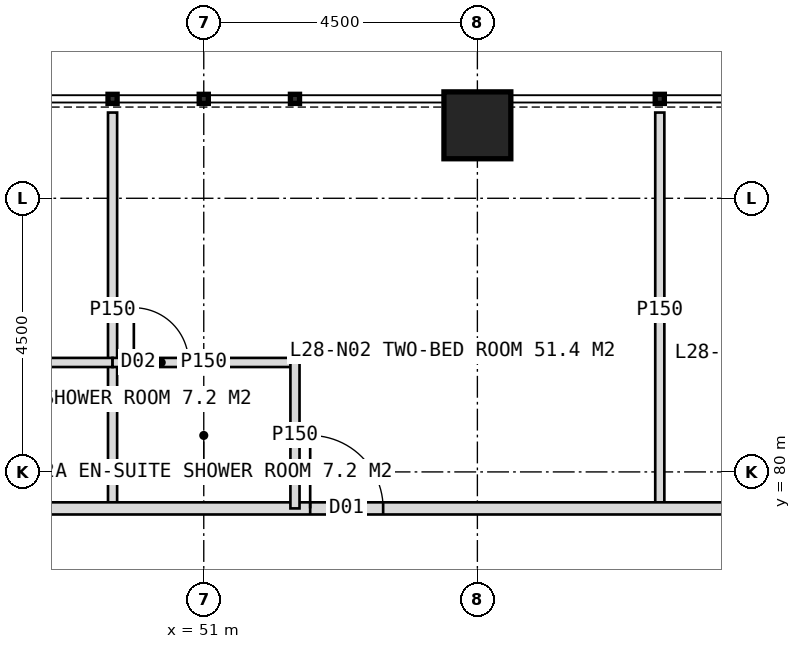
"""IFC4 building model, lengths in metres.
Left out: names, types, materials, properties, quantities, classifications, styles, units other than length and angle.
Written with IfcOpenShell. Run it as: python <this file> out.ifc"""

import sys

from ifc_helpers import new_model, si_unit, direction, frame, frame_2d, origin, origin_2d, place, context, subcontext, project, spatial, rectangle, hollow_rectangle, extrude, element, fill, save


model = new_model("IFC4")
c1 = context("Model", 3, precision=1e-05, world=origin(), true_north=direction((0.0, 1.0)))
c2 = subcontext(c1, "Body", "Model", "MODEL_VIEW")
j1 = project(units=[si_unit("LENGTHUNIT", "METRE"), si_unit("PLANEANGLEUNIT", "RADIAN")], contexts=[c1])
p1 = place(None, origin())
s1 = spatial("IfcSite", under=j1, at=p1, CompositionType="ELEMENT")
p2 = place(p1, origin())
s2 = spatial("IfcBuilding", under=s1, at=p2, CompositionType="ELEMENT")
p3 = place(p2, frame((0.0, 0.0, 120.0)))
s3 = spatial("IfcBuildingStorey", under=s2, at=p3, CompositionType="ELEMENT", Elevation=120.0)
p4 = place(p3, frame((55.5, 85.7, 0.0), z_axis=(0.0, 0.0, 1.0), x_axis=(1.0, 0.0, 0.0)))
e1 = element("IfcColumn", 1, at=p4, inside=s3, PredefinedType="COLUMN", context=c2, shape_type="SweptSolid", body=[
    extrude(hollow_rectangle(XDim=1.1, YDim=1.1, WallThickness=0.1, at=origin_2d()), origin(), (0.0, 0.0, 1.0), 4.0),
])
for number, where, z_axis, x_axis in (
    (2, (49.5, 79.4, 0.0), (0.0, 0.0, 1.0), (0.0, 1.0, 0.0)),
    (3, (58.5, 79.4, 0.0), (0.0, 0.0, 1.0), (0.0, 1.0, 0.0)),
):
    element("IfcWall", number, at=place(p3, frame(where, z_axis=z_axis, x_axis=x_axis)), inside=s3, PredefinedType="PARTITIONING", context=c2, shape_type="SweptSolid", body=[
        extrude(rectangle(XDim=6.51, YDim=0.15, at=frame_2d((3.255, 0.0))), origin(), (0.0, 0.0, 1.0), 3.75),
    ])
p5 = place(p3, frame((42.6, 79.4, 0.0), z_axis=(0.0, 0.0, 1.0), x_axis=(1.0, 0.0, 0.0)))
e4 = element("IfcWall", 4, at=p5, inside=s3, PredefinedType="PARTITIONING", context=c2, shape_type="SweptSolid", body=[
    extrude(rectangle(XDim=34.8, YDim=0.2, at=frame_2d((17.4, 0.0))), origin(), (0.0, 0.0, 1.0), 3.75),
])
p6 = place(p5, frame((2.45, 0.0, 0.0)))
e5 = element("IfcOpeningElement", 5, at=p6, cuts=e4, PredefinedType="OPENING", context=c2, shape_type="SweptSolid", body=[
    extrude(rectangle(XDim=1.2, YDim=2.2, at=frame_2d((0.6, 1.1))), frame((0.0, 0.11, 0.0), z_axis=(0.0, -1.0, 0.0), x_axis=(1.0, 0.0, 0.0)), (0.0, 0.0, 1.0), 0.22),
])
p7 = place(p5, frame((10.15, 0.0, 0.0)))
e6 = element("IfcOpeningElement", 6, at=p7, cuts=e4, PredefinedType="OPENING", context=c2, shape_type="SweptSolid", body=[
    extrude(rectangle(XDim=1.2, YDim=2.2, at=frame_2d((0.6, 1.1))), frame((0.0, 0.11, 0.0), z_axis=(0.0, -1.0, 0.0), x_axis=(1.0, 0.0, 0.0)), (0.0, 0.0, 1.0), 0.22),
])
p8 = place(p5, frame((19.8, 0.0, 0.0)))
e7 = element("IfcOpeningElement", 7, at=p8, cuts=e4, PredefinedType="OPENING", context=c2, shape_type="SweptSolid", body=[
    extrude(rectangle(XDim=1.2, YDim=2.2, at=frame_2d((0.6, 1.1))), frame((0.0, 0.11, 0.0), z_axis=(0.0, -1.0, 0.0), x_axis=(1.0, 0.0, 0.0)), (0.0, 0.0, 1.0), 0.22),
])
p9 = place(p5, frame((27.55, 0.0, 0.0)))
e8 = element("IfcOpeningElement", 8, at=p9, cuts=e4, PredefinedType="OPENING", context=c2, shape_type="SweptSolid", body=[
    extrude(rectangle(XDim=1.2, YDim=2.2, at=frame_2d((0.6, 1.1))), frame((0.0, 0.11, 0.0), z_axis=(0.0, -1.0, 0.0), x_axis=(1.0, 0.0, 0.0)), (0.0, 0.0, 1.0), 0.22),
])
p10 = place(p3, frame((46.5, 81.8, 0.0), z_axis=(0.0, 0.0, 1.0), x_axis=(1.0, 0.0, 0.0)))
e9 = element("IfcWall", 9, at=p10, inside=s3, PredefinedType="PARTITIONING", context=c2, shape_type="SweptSolid", body=[
    extrude(rectangle(XDim=3.0, YDim=0.15, at=frame_2d((1.5, 0.0))), origin(), (0.0, 0.0, 1.0), 3.75),
])
p11 = place(p10, frame((0.35, 0.0, 0.0)))
e10 = element("IfcOpeningElement", 10, at=p11, cuts=e9, PredefinedType="OPENING", context=c2, shape_type="SweptSolid", body=[
    extrude(rectangle(XDim=0.9, YDim=2.1, at=frame_2d((0.45, 1.05))), frame((0.0, 0.085, 0.0), z_axis=(0.0, -1.0, 0.0), x_axis=(1.0, 0.0, 0.0)), (0.0, 0.0, 1.0), 0.17),
])
p12 = place(p3, frame((49.5, 81.8, 0.0), z_axis=(0.0, 0.0, 1.0), x_axis=(1.0, 0.0, 0.0)))
e11 = element("IfcWall", 11, at=p12, inside=s3, PredefinedType="PARTITIONING", context=c2, shape_type="SweptSolid", body=[
    extrude(rectangle(XDim=3.0, YDim=0.15, at=frame_2d((1.5, 0.0))), origin(), (0.0, 0.0, 1.0), 3.75),
])
p13 = place(p12, frame((0.35, 0.0, 0.0)))
e12 = element("IfcOpeningElement", 12, at=p13, cuts=e11, PredefinedType="OPENING", context=c2, shape_type="SweptSolid", body=[
    extrude(rectangle(XDim=0.9, YDim=2.1, at=frame_2d((0.45, 1.05))), frame((0.0, 0.085, 0.0), z_axis=(0.0, -1.0, 0.0), x_axis=(1.0, 0.0, 0.0)), (0.0, 0.0, 1.0), 0.17),
])
p14 = place(p3, frame((52.5, 79.4, 0.0), z_axis=(0.0, 0.0, 1.0), x_axis=(0.0, 1.0, 0.0)))
e13 = element("IfcWall", 13, at=p14, inside=s3, PredefinedType="PARTITIONING", context=c2, shape_type="SweptSolid", body=[
    extrude(rectangle(XDim=2.4, YDim=0.15, at=frame_2d((1.2, 0.0))), origin(), (0.0, 0.0, 1.0), 3.75),
])
p15 = place(p7, origin())
e14 = element("IfcDoor", 14, at=p15, inside=s3, OperationType="SINGLE_SWING_LEFT", PredefinedType="DOOR", context=c2, shape_type="SweptSolid", body=[
    extrude(rectangle(XDim=1.2, YDim=2.2, at=frame_2d((0.6, 1.1))), frame((0.0, 0.025, 0.0), z_axis=(0.0, -1.0, 0.0), x_axis=(1.0, 0.0, 0.0)), (0.0, 0.0, 1.0), 0.05),
])
fill(e6, e14)
p16 = place(p13, origin())
e15 = element("IfcDoor", 15, at=p16, inside=s3, OperationType="SINGLE_SWING_LEFT", PredefinedType="DOOR", context=c2, shape_type="SweptSolid", body=[
    extrude(rectangle(XDim=0.9, YDim=2.1, at=frame_2d((0.45, 1.05))), frame((0.0, 0.025, 0.0), z_axis=(0.0, -1.0, 0.0), x_axis=(1.0, 0.0, 0.0)), (0.0, 0.0, 1.0), 0.05),
])
fill(e12, e15)
save(model, sys.argv[1])
